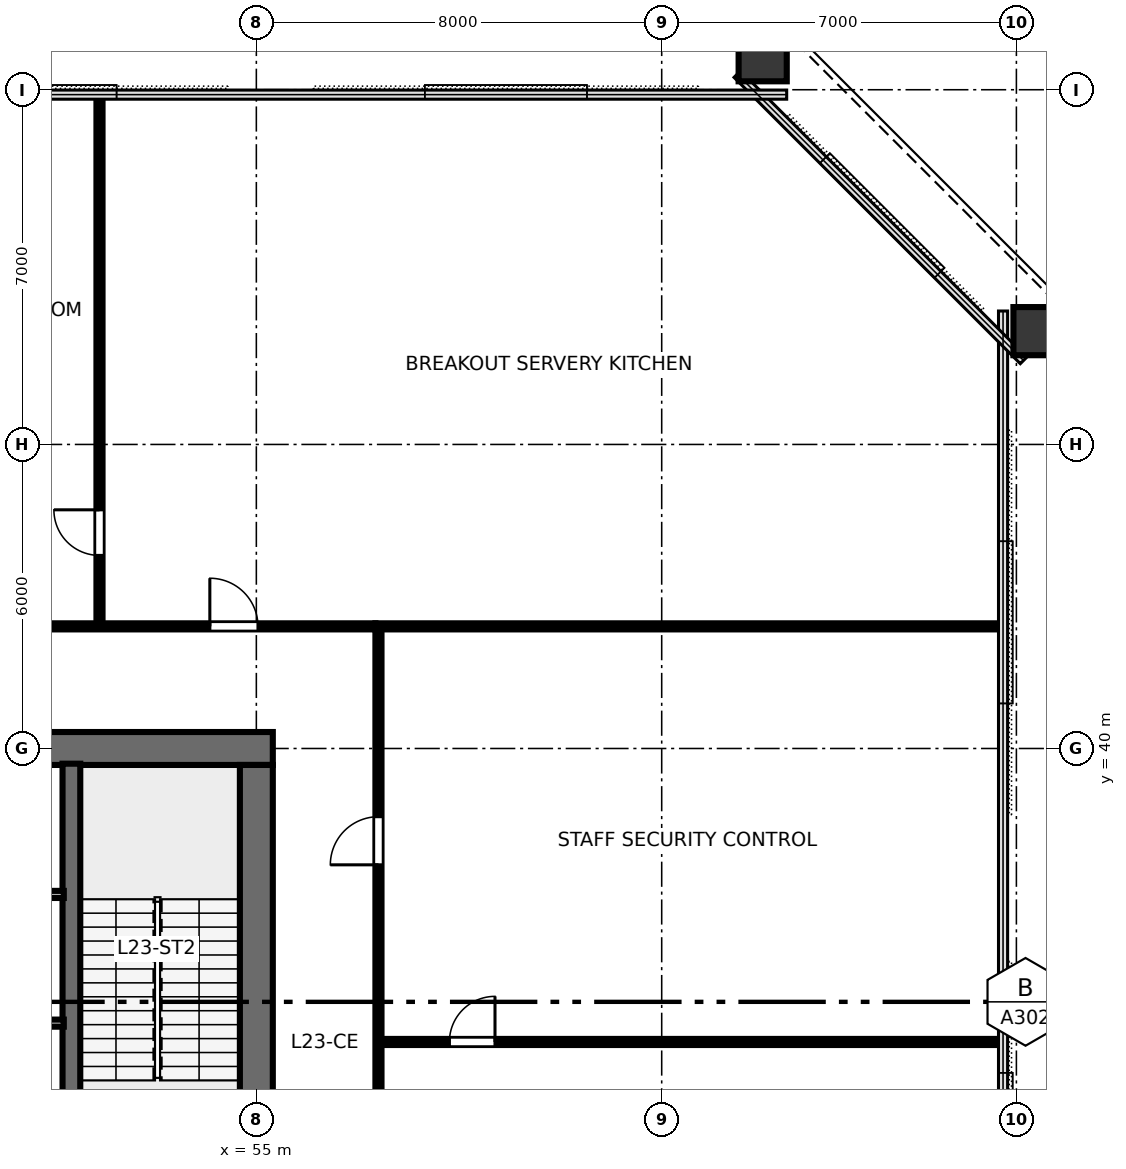
"""IFC4 building model, lengths in metres.
Left out: names, types, materials, properties, quantities, classifications, styles, units other than length and angle.
Written with IfcOpenShell. Run it as: python <this file> out.ifc"""

import sys

from ifc_helpers import new_model, si_unit, direction, frame, frame_2d, origin, origin_2d, place, context, subcontext, project, spatial, rectangle, hollow_rectangle, extrude, element, fill, save


model = new_model("IFC4")
c1 = context("Model", 3, precision=1e-05, world=origin(), true_north=direction((0.0, 1.0)))
c2 = subcontext(c1, "Body", "Model", "MODEL_VIEW")
j1 = project(units=[si_unit("LENGTHUNIT", "METRE"), si_unit("PLANEANGLEUNIT", "RADIAN")], contexts=[c1])
p1 = place(None, origin())
s1 = spatial("IfcSite", under=j1, at=p1, CompositionType="ELEMENT")
p2 = place(p1, origin())
s2 = spatial("IfcBuilding", under=s1, at=p2, CompositionType="ELEMENT")
p3 = place(p2, frame((0.0, 0.0, 90.4)))
s3 = spatial("IfcBuildingStorey", under=s2, at=p3, CompositionType="ELEMENT", Elevation=90.4)
p4 = place(p3, frame((36.675, 40.0, 0.0), z_axis=(0.0, 0.0, 1.0), x_axis=(1.0, 0.0, 0.0)))
e1 = element("IfcWall", 1, at=p4, inside=s3, PredefinedType="SHEAR", context=c2, shape_type="SweptSolid", body=[
    extrude(rectangle(XDim=18.65, YDim=0.65, at=frame_2d((9.325, 0.0))), origin(), (0.0, 0.0, 1.0), 4.56),
])
p5 = place(p4, frame((10.625, 0.0, 0.0)))
e2 = element("IfcOpeningElement", 2, at=p5, cuts=e1, PredefinedType="OPENING", context=c2, shape_type="SweptSolid", body=[
    extrude(rectangle(XDim=1.0, YDim=2.15, at=frame_2d((0.5, 1.075))), frame((0.0, 0.335, 0.0), z_axis=(0.0, -1.0, 0.0), x_axis=(1.0, 0.0, 0.0)), (0.0, 0.0, 1.0), 0.67),
])
p6 = place(p3, frame((55.0, 24.325, 0.0), z_axis=(0.0, 0.0, 1.0), x_axis=(0.0, 1.0, 0.0)))
e3 = element("IfcWall", 3, at=p6, inside=s3, PredefinedType="SHEAR", context=c2, shape_type="SweptSolid", body=[
    extrude(rectangle(XDim=15.35, YDim=0.65, at=frame_2d((7.675, 0.0))), origin(), (0.0, 0.0, 1.0), 4.56),
])
p7 = place(p6, frame((5.2, 0.0, 0.0)))
e4 = element("IfcOpeningElement", 4, at=p7, cuts=e3, PredefinedType="OPENING", context=c2, shape_type="SweptSolid", body=[
    extrude(rectangle(XDim=1.15, YDim=2.15, at=frame_2d((0.575, 1.075))), frame((0.0, 0.335, 0.0), z_axis=(0.0, -1.0, 0.0), x_axis=(1.0, 0.0, 0.0)), (0.0, 0.0, 1.0), 0.67),
])
p8 = place(p3, frame((70.516, 48.236, 0.0), z_axis=(-0.047661225314, -0.050760273597, 0.997572955841), x_axis=(0.68284118346, 0.727241170725, 0.069629000955)))
e5 = element("IfcColumn", 5, at=p8, inside=s3, PredefinedType="COLUMN", context=c2, shape_type="SweptSolid", body=[
    extrude(hollow_rectangle(XDim=0.95, YDim=1.15, WallThickness=0.06, at=origin_2d()), origin(), (0.0, 0.0, 1.0), 4.569),
])
p9 = place(p3, frame((64.993, 53.741, 0.0), z_axis=(-0.058022511791, -0.040444789527, 0.997495667723), x_axis=(0.571838881264, -0.820365951192, 0.0)))
e6 = element("IfcColumn", 6, at=p9, inside=s3, PredefinedType="COLUMN", context=c2, shape_type="SweptSolid", body=[
    extrude(hollow_rectangle(XDim=0.95, YDim=1.15, WallThickness=0.06, at=origin_2d()), origin(), (0.0, 0.0, 1.0), 4.57),
])
p10 = place(p3, frame((51.35, 32.0, 0.0), z_axis=(0.0, 0.0, 1.0), x_axis=(0.0, 1.0, 0.0)))
e7 = element("IfcWall", 7, at=p10, inside=s3, PredefinedType="SHEAR", context=c2, shape_type="SweptSolid", body=[
    extrude(rectangle(XDim=7.7, YDim=0.35, at=frame_2d((3.85, 0.0))), origin(), (0.0, 0.0, 1.0), 4.8),
])
for number, where, z_axis, x_axis in (
    (8, (48.8, 34.58, 0.0), (0.0, 0.0, 1.0), (1.0, 0.0, 0.0)),
    (9, (48.8, 37.12, 0.0), (0.0, 0.0, 1.0), (1.0, 0.0, 0.0)),
):
    element("IfcWall", number, at=place(p3, frame(where, z_axis=z_axis, x_axis=x_axis)), inside=s3, PredefinedType="PARTITIONING", context=c2, shape_type="SweptSolid", body=[
        extrude(rectangle(XDim=2.4, YDim=0.14, at=frame_2d((1.2, 0.0))), origin(), (0.0, 0.0, 1.0), 4.56),
    ])
p11 = place(p3, frame((51.904, 42.41, 0.0), z_axis=(0.0, 0.0, 1.0), x_axis=(0.0, 1.0, 0.0)))
e10 = element("IfcWall", 10, at=p11, inside=s3, PredefinedType="PARTITIONING", context=c2, shape_type="SweptSolid", body=[
    extrude(rectangle(XDim=10.493, YDim=0.12, at=frame_2d((5.247, 0.0))), origin(), (0.0, 0.0, 1.0), 3.84),
])
p12 = place(p11, frame((1.4, 0.0, 0.0)))
e11 = element("IfcOpeningElement", 11, at=p12, cuts=e10, PredefinedType="OPENING", context=c2, shape_type="SweptSolid", body=[
    extrude(rectangle(XDim=0.9, YDim=2.15, at=frame_2d((0.45, 1.075))), frame((0.0, 0.07, 0.0), z_axis=(0.0, -1.0, 0.0), x_axis=(1.0, 0.0, 0.0)), (0.0, 0.0, 1.0), 0.14),
])
p13 = place(p3, frame((34.65, 42.41, 0.0), z_axis=(0.0, 0.0, 1.0), x_axis=(1.0, 0.0, 0.0)))
e12 = element("IfcWall", 12, at=p13, inside=s3, PredefinedType="PARTITIONING", context=c2, shape_type="SweptSolid", body=[
    extrude(rectangle(XDim=22.7, YDim=0.12, at=frame_2d((11.35, 0.0))), origin(), (0.0, 0.0, 1.0), 3.84),
])
p14 = place(p13, frame((3.706, 0.0, 0.0)))
e13 = element("IfcOpeningElement", 13, at=p14, cuts=e12, PredefinedType="OPENING", context=c2, shape_type="SweptSolid", body=[
    extrude(rectangle(XDim=0.95, YDim=2.15, at=frame_2d((0.475, 1.075))), frame((0.0, 0.07, 0.0), z_axis=(0.0, -1.0, 0.0), x_axis=(1.0, 0.0, 0.0)), (0.0, 0.0, 1.0), 0.14),
])
p15 = place(p13, frame((9.506, 0.0, 0.0)))
e14 = element("IfcOpeningElement", 14, at=p15, cuts=e12, PredefinedType="OPENING", context=c2, shape_type="SweptSolid", body=[
    extrude(rectangle(XDim=0.95, YDim=2.15, at=frame_2d((0.475, 1.075))), frame((0.0, 0.07, 0.0), z_axis=(0.0, -1.0, 0.0), x_axis=(1.0, 0.0, 0.0)), (0.0, 0.0, 1.0), 0.14),
])
p16 = place(p13, frame((14.022, 0.0, 0.0)))
e15 = element("IfcOpeningElement", 15, at=p16, cuts=e12, PredefinedType="OPENING", context=c2, shape_type="SweptSolid", body=[
    extrude(rectangle(XDim=0.95, YDim=2.15, at=frame_2d((0.475, 1.075))), frame((0.0, 0.07, 0.0), z_axis=(0.0, -1.0, 0.0), x_axis=(1.0, 0.0, 0.0)), (0.0, 0.0, 1.0), 0.14),
])
p17 = place(p13, frame((19.432, 0.0, 0.0)))
e16 = element("IfcOpeningElement", 16, at=p17, cuts=e12, PredefinedType="OPENING", context=c2, shape_type="SweptSolid", body=[
    extrude(rectangle(XDim=0.95, YDim=2.15, at=frame_2d((0.475, 1.075))), frame((0.0, 0.07, 0.0), z_axis=(0.0, -1.0, 0.0), x_axis=(1.0, 0.0, 0.0)), (0.0, 0.0, 1.0), 0.14),
])
p18 = place(p3, frame((57.41, 34.208, 0.0), z_axis=(0.0, 0.0, 1.0), x_axis=(1.0, 0.0, 0.0)))
e17 = element("IfcWall", 17, at=p18, inside=s3, PredefinedType="PARTITIONING", context=c2, shape_type="SweptSolid", body=[
    extrude(rectangle(XDim=12.327, YDim=0.12, at=frame_2d((6.164, 0.0))), origin(), (0.0, 0.0, 1.0), 3.84),
])
p19 = place(p18, frame((1.4, 0.0, 0.0)))
e18 = element("IfcOpeningElement", 18, at=p19, cuts=e17, PredefinedType="OPENING", context=c2, shape_type="SweptSolid", body=[
    extrude(rectangle(XDim=0.9, YDim=2.15, at=frame_2d((0.45, 1.075))), frame((0.0, 0.07, 0.0), z_axis=(0.0, -1.0, 0.0), x_axis=(1.0, 0.0, 0.0)), (0.0, 0.0, 1.0), 0.14),
])
p20 = place(p3, frame((57.41, 21.65, 0.0), z_axis=(0.0, 0.0, 1.0), x_axis=(0.0, 1.0, 0.0)))
e19 = element("IfcWall", 19, at=p20, inside=s3, PredefinedType="PARTITIONING", context=c2, shape_type="SweptSolid", body=[
    extrude(rectangle(XDim=20.7, YDim=0.12, at=frame_2d((10.35, 0.0))), origin(), (0.0, 0.0, 1.0), 3.84),
])
p21 = place(p20, frame((5.904, 0.0, 0.0)))
e20 = element("IfcOpeningElement", 20, at=p21, cuts=e19, PredefinedType="OPENING", context=c2, shape_type="SweptSolid", body=[
    extrude(rectangle(XDim=0.95, YDim=2.15, at=frame_2d((0.475, 1.075))), frame((0.0, 0.07, 0.0), z_axis=(0.0, -1.0, 0.0), x_axis=(1.0, 0.0, 0.0)), (0.0, 0.0, 1.0), 0.14),
])
p22 = place(p20, frame((16.054, 0.0, 0.0)))
e21 = element("IfcOpeningElement", 21, at=p22, cuts=e19, PredefinedType="OPENING", context=c2, shape_type="SweptSolid", body=[
    extrude(rectangle(XDim=0.95, YDim=2.15, at=frame_2d((0.475, 1.075))), frame((0.0, 0.07, 0.0), z_axis=(0.0, -1.0, 0.0), x_axis=(1.0, 0.0, 0.0)), (0.0, 0.0, 1.0), 0.14),
])
p23 = place(p3, frame((57.35, 42.41, 0.0), z_axis=(0.0, 0.0, 1.0), x_axis=(1.0, 0.0, 0.0)))
e22 = element("IfcWall", 22, at=p23, inside=s3, PredefinedType="PARTITIONING", context=c2, shape_type="SweptSolid", body=[
    extrude(rectangle(XDim=12.387, YDim=0.12, at=frame_2d((6.193, 0.0))), origin(), (0.0, 0.0, 1.0), 3.84),
])
p24 = place(p12, origin())
e23 = element("IfcDoor", 23, at=p24, inside=s3, OperationType="SINGLE_SWING_RIGHT", PredefinedType="DOOR", context=c2, shape_type="SweptSolid", body=[
    extrude(rectangle(XDim=0.9, YDim=2.15, at=frame_2d((0.45, 1.075))), frame((0.0, 0.025, 0.0), z_axis=(0.0, -1.0, 0.0), x_axis=(1.0, 0.0, 0.0)), (0.0, 0.0, 1.0), 0.05),
])
fill(e11, e23)
p25 = place(p17, origin())
e24 = element("IfcDoor", 24, at=p25, inside=s3, OperationType="SINGLE_SWING_LEFT", PredefinedType="DOOR", context=c2, shape_type="SweptSolid", body=[
    extrude(rectangle(XDim=0.95, YDim=2.15, at=frame_2d((0.475, 1.075))), frame((0.0, 0.025, 0.0), z_axis=(0.0, -1.0, 0.0), x_axis=(1.0, 0.0, 0.0)), (0.0, 0.0, 1.0), 0.05),
])
fill(e16, e24)
p26 = place(p19, origin())
e25 = element("IfcDoor", 25, at=p26, inside=s3, OperationType="SINGLE_SWING_RIGHT", PredefinedType="DOOR", context=c2, shape_type="SweptSolid", body=[
    extrude(rectangle(XDim=0.9, YDim=2.15, at=frame_2d((0.45, 1.075))), frame((0.0, 0.025, 0.0), z_axis=(0.0, -1.0, 0.0), x_axis=(1.0, 0.0, 0.0)), (0.0, 0.0, 1.0), 0.05),
])
fill(e18, e25)
p27 = place(p22, origin())
e26 = element("IfcDoor", 26, at=p27, inside=s3, OperationType="SINGLE_SWING_LEFT", PredefinedType="DOOR", context=c2, shape_type="SweptSolid", body=[
    extrude(rectangle(XDim=0.95, YDim=2.15, at=frame_2d((0.475, 1.075))), frame((0.0, 0.025, 0.0), z_axis=(0.0, -1.0, 0.0), x_axis=(1.0, 0.0, 0.0)), (0.0, 0.0, 1.0), 0.05),
])
fill(e21, e26)
save(model, sys.argv[1])
